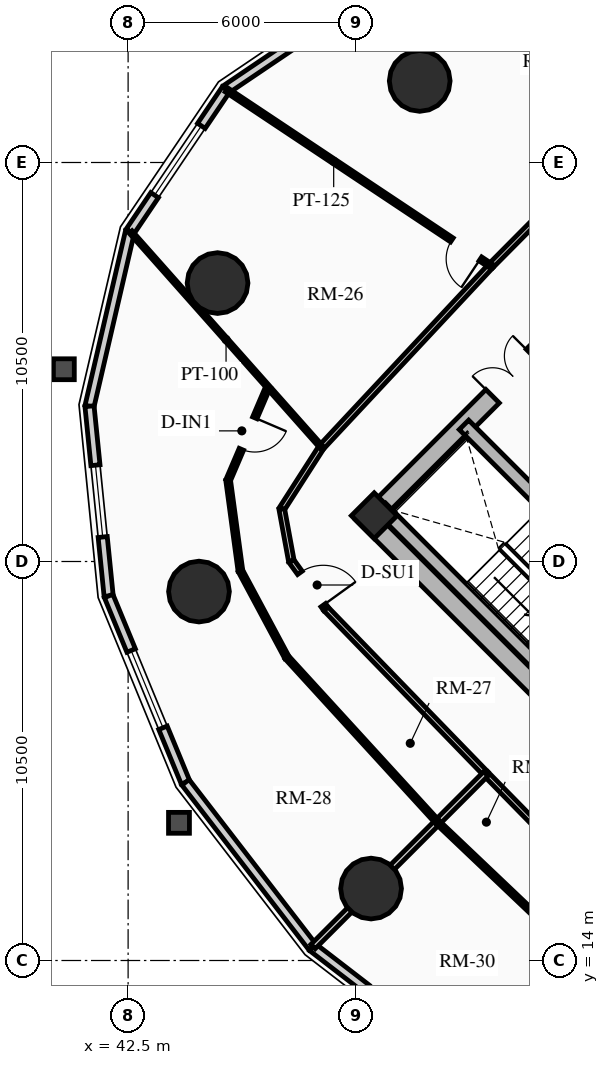
"""IFC4 building model, lengths in metres.
Left out: names, types, materials, properties, quantities, classifications, styles, units other than length and angle.
Written with IfcOpenShell. Run it as: python <this file> out.ifc"""

import sys

from ifc_helpers import new_model, si_unit, direction, frame, frame_2d, origin, origin_2d, place, context, subcontext, project, spatial, rectangle, circle, extrude, source, transform, mapped, element, fill, save


model = new_model("IFC4")
c1 = context("Model", 3, precision=1e-05, world=origin(), true_north=direction((0.0, 1.0)))
c2 = subcontext(c1, "Body", "Model", "MODEL_VIEW")
j1 = project(units=[si_unit("LENGTHUNIT", "METRE"), si_unit("PLANEANGLEUNIT", "RADIAN")], contexts=[c1])
p1 = place(None, origin())
s1 = spatial("IfcSite", under=j1, at=p1, CompositionType="ELEMENT")
p2 = place(p1, origin())
s2 = spatial("IfcBuilding", under=s1, at=p2, CompositionType="ELEMENT")
p3 = place(p2, frame((0.0, 0.0, 27.82)))
s3 = spatial("IfcBuildingStorey", under=s2, at=p3, CompositionType="ELEMENT", Elevation=27.82)
p4 = place(p3, frame((58.773, 15.661, 0.0), z_axis=(0.0, 0.0, 1.0), x_axis=(-0.707106781187, 0.707106781187, 0.0)))
e1 = element("IfcWall", 1, at=p4, inside=s3, PredefinedType="SHEAR", context=c2, shape_type="SweptSolid", body=[
    extrude(rectangle(XDim=14.3, YDim=0.5, at=frame_2d((7.15, 0.0))), origin(), (0.0, 0.0, 1.0), 2.91),
])
p5 = place(p3, frame((48.838, 25.596, 0.0), z_axis=(0.0, 0.0, 1.0), x_axis=(0.707106781187, 0.707106781187, 0.0)))
e2 = element("IfcWall", 2, at=p5, inside=s3, PredefinedType="SHEAR", context=c2, shape_type="SweptSolid", body=[
    extrude(rectangle(XDim=10.7, YDim=0.5, at=frame_2d((5.35, 0.0))), origin(), (0.0, 0.0, 1.0), 2.91),
])
m1 = source(origin(), c2, "Body", "SweptSolid", [
    extrude(rectangle(XDim=1.5, YDim=2.02, at=frame_2d((0.75, 1.01))), frame((0.0, 0.26, 0.0), z_axis=(0.0, -1.0, 0.0), x_axis=(1.0, 0.0, 0.0)), (0.0, 0.0, 1.0), 0.52),
])
p6 = place(p5, frame((4.6, 0.0, 0.0)))
e3 = element("IfcOpeningElement", 3, at=p6, cuts=e2, PredefinedType="OPENING", context=c2, shape_type="MappedRepresentation", body=[
    mapped(m1, transform((0.0, 0.0, 0.0), x_axis=(1.0, 0.0, 0.0), y_axis=(0.0, 1.0, 0.0), z_axis=(0.0, 0.0, 1.0), scale=1.0)),
])
p7 = place(p3, frame((61.096, 18.338, 0.0), z_axis=(0.0, 0.0, 1.0), x_axis=(-0.707106781187, 0.707106781187, 0.0)))
e4 = element("IfcWall", 4, at=p7, inside=s3, PredefinedType="SHEAR", context=c2, shape_type="SweptSolid", body=[
    extrude(rectangle(XDim=13.8, YDim=0.35, at=frame_2d((6.9, 0.0))), origin(), (0.0, 0.0, 1.0), 2.91),
])
m2 = source(origin(), c2, "Body", "SweptSolid", [
    extrude(rectangle(XDim=1.1, YDim=2.015, at=frame_2d((0.55, 1.007))), frame((0.0, 0.185, 0.0), z_axis=(0.0, -1.0, 0.0), x_axis=(1.0, 0.0, 0.0)), (0.0, 0.0, 1.0), 0.37),
])
p8 = place(p7, frame((4.9, 0.0, 0.0)))
e5 = element("IfcOpeningElement", 5, at=p8, cuts=e4, PredefinedType="OPENING", context=c2, shape_type="MappedRepresentation", body=[
    mapped(m2, transform((0.0, 0.0, 0.0), x_axis=(1.0, 0.0, 0.0), y_axis=(0.0, 1.0, 0.0), z_axis=(0.0, 0.0, 1.0), scale=1.0)),
])
m3 = source(origin(), c2, "Body", "SweptSolid", [
    extrude(rectangle(XDim=1.15, YDim=2.02, at=frame_2d((0.575, 1.01))), frame((0.0, 0.185, 0.0), z_axis=(0.0, -1.0, 0.0), x_axis=(1.0, 0.0, 0.0)), (0.0, 0.0, 1.0), 0.37),
])
p9 = place(p7, frame((7.32, 0.0, 0.0)))
e6 = element("IfcOpeningElement", 6, at=p9, cuts=e4, PredefinedType="OPENING", context=c2, shape_type="MappedRepresentation", body=[
    mapped(m3, transform((0.0, 0.0, 0.0), x_axis=(1.0, 0.0, 0.0), y_axis=(0.0, 1.0, 0.0), z_axis=(0.0, 0.0, 1.0), scale=1.0)),
])
p10 = place(p3, frame((53.922, 21.141, 0.0), z_axis=(0.0, 0.0, 1.0), x_axis=(-0.707106781187, 0.707106781187, 0.0)))
e7 = element("IfcWall", 7, at=p10, inside=s3, PredefinedType="SHEAR", context=c2, shape_type="SweptSolid", body=[
    extrude(rectangle(XDim=6.745, YDim=0.35, at=frame_2d((3.373, 0.0))), origin(), (0.0, 0.0, 1.0), 2.91),
])
p11 = place(p3, frame((48.976, 25.706, 0.0), z_axis=(0.0, 0.0, 1.0), x_axis=(0.707106781187, 0.707106781187, 0.0)))
e8 = element("IfcColumn", 8, at=p11, inside=s3, PredefinedType="COLUMN", context=c2, shape_type="SweptSolid", body=[
    extrude(rectangle(XDim=0.85, YDim=0.85, at=origin_2d()), origin(), (0.0, 0.0, 1.0), 2.91),
])
for number, where, z_axis, x_axis in (
    (9, (50.173, 37.146, 0.0), (0.0, 0.0, 1.0), (1.0, 0.0, 0.0)),
    (10, (44.854, 31.827, 0.0), (0.0, 0.0, 1.0), (1.0, 0.0, 0.0)),
    (11, (44.365, 23.709, 0.0), (0.0, 0.0, 1.0), (1.0, 0.0, 0.0)),
    (12, (48.893, 15.893, 0.0), (0.0, 0.0, 1.0), (1.0, 0.0, 0.0)),
):
    element("IfcColumn", number, at=place(p3, frame(where, z_axis=z_axis, x_axis=x_axis)), inside=s3, PredefinedType="USERDEFINED", context=c2, shape_type="SweptSolid", body=[
        extrude(circle(Radius=0.8, at=origin_2d()), origin(), (0.0, 0.0, 1.0), 2.91),
    ])
p12 = place(p3, frame((45.076, 36.924, 0.0), z_axis=(0.0, 0.0, 1.0), x_axis=(0.828776615238, 0.559579594012, 0.0)))
e13 = element("IfcWall", 13, at=p12, inside=s3, PredefinedType="SOLIDWALL", context=c2, shape_type="SweptSolid", body=[
    extrude(rectangle(XDim=4.517, YDim=0.24, at=frame_2d((2.259, 0.0))), origin(), (0.0, 0.0, 1.0), 2.635),
])
p13 = place(p3, frame((42.548, 33.18, 0.0), z_axis=(0.0, 0.0, 1.0), x_axis=(0.559579594012, 0.828776615238, 0.0)))
e14 = element("IfcWall", 14, at=p13, inside=s3, PredefinedType="SOLIDWALL", context=c2, shape_type="SweptSolid", body=[
    extrude(rectangle(XDim=4.517, YDim=0.24, at=frame_2d((2.259, 0.0))), origin(), (0.0, 0.0, 1.0), 2.635),
])
m4 = source(origin(), c2, "Body", "SweptSolid", [
    extrude(rectangle(XDim=2.2, YDim=1.35, at=frame_2d((1.1, 0.675))), frame((0.0, 0.13, 0.0), z_axis=(0.0, -1.0, 0.0), x_axis=(1.0, 0.0, 0.0)), (0.0, 0.0, 1.0), 0.26),
])
p14 = place(p13, frame((1.159, 0.0, 0.65)))
e15 = element("IfcOpeningElement", 15, at=p14, cuts=e14, PredefinedType="OPENING", context=c2, shape_type="MappedRepresentation", body=[
    mapped(m4, transform((0.0, 0.0, 0.0), x_axis=(1.0, 0.0, 0.0), y_axis=(0.0, 1.0, 0.0), z_axis=(0.0, 0.0, 1.0), scale=1.0)),
])
p15 = place(p3, frame((41.484, 28.586, 0.0), z_axis=(0.0, 0.0, 1.0), x_axis=(0.225698919833, 0.974197104074, 0.0)))
e16 = element("IfcWall", 16, at=p15, inside=s3, PredefinedType="SOLIDWALL", context=c2, shape_type="SweptSolid", body=[
    extrude(rectangle(XDim=4.715, YDim=0.24, at=frame_2d((2.357, 0.0))), origin(), (0.0, 0.0, 1.0), 2.635),
])
p16 = place(p3, frame((41.988, 23.593, 0.0), z_axis=(0.0, 0.0, 1.0), x_axis=(-0.100356187272, 0.994951574538, 0.0)))
e17 = element("IfcWall", 17, at=p16, inside=s3, PredefinedType="SOLIDWALL", context=c2, shape_type="SweptSolid", body=[
    extrude(rectangle(XDim=5.019, YDim=0.24, at=frame_2d((2.509, 0.0))), origin(), (0.0, 0.0, 1.0), 2.635),
])
m5 = source(origin(), c2, "Body", "SweptSolid", [
    extrude(rectangle(XDim=1.9, YDim=1.35, at=frame_2d((0.95, 0.675))), frame((0.0, 0.13, 0.0), z_axis=(0.0, -1.0, 0.0), x_axis=(1.0, 0.0, 0.0)), (0.0, 0.0, 1.0), 0.26),
])
p17 = place(p16, frame((1.559, 0.0, 0.65)))
e18 = element("IfcOpeningElement", 18, at=p17, cuts=e17, PredefinedType="OPENING", context=c2, shape_type="MappedRepresentation", body=[
    mapped(m5, transform((0.0, 0.0, 0.0), x_axis=(1.0, 0.0, 0.0), y_axis=(0.0, 1.0, 0.0), z_axis=(0.0, 0.0, 1.0), scale=1.0)),
])
p18 = place(p3, frame((44.01, 18.688, 0.0), z_axis=(0.0, 0.0, 1.0), x_axis=(-0.381113147118, 0.924528403616, 0.0)))
e19 = element("IfcWall", 19, at=p18, inside=s3, PredefinedType="SOLIDWALL", context=c2, shape_type="SweptSolid", body=[
    extrude(rectangle(XDim=5.305, YDim=0.24, at=frame_2d((2.653, 0.0))), origin(), (0.0, 0.0, 1.0), 2.635),
])
p19 = place(p18, frame((1.553, 0.0, 0.65)))
e20 = element("IfcOpeningElement", 20, at=p19, cuts=e19, PredefinedType="OPENING", context=c2, shape_type="MappedRepresentation", body=[
    mapped(m4, transform((0.0, 0.0, 0.0), x_axis=(1.0, 0.0, 0.0), y_axis=(0.0, 1.0, 0.0), z_axis=(0.0, 0.0, 1.0), scale=1.0)),
])
p20 = place(p3, frame((47.352, 14.352, 0.0), z_axis=(0.0, 0.0, 1.0), x_axis=(-0.610557396243, 0.791972010801, 0.0)))
e21 = element("IfcWall", 21, at=p20, inside=s3, PredefinedType="SOLIDWALL", context=c2, shape_type="SweptSolid", body=[
    extrude(rectangle(XDim=5.475, YDim=0.24, at=frame_2d((2.737, 0.0))), origin(), (0.0, 0.0, 1.0), 2.073),
])
p21 = place(p3, frame((51.688, 11.01, 0.0), z_axis=(0.0, 0.0, 1.0), x_axis=(-0.791972010801, 0.610557396243, 0.0)))
e22 = element("IfcWall", 22, at=p21, inside=s3, PredefinedType="SOLIDWALL", context=c2, shape_type="SweptSolid", body=[
    extrude(rectangle(XDim=5.475, YDim=0.24, at=frame_2d((2.737, 0.0))), origin(), (0.0, 0.0, 1.0), 2.073),
])
p22 = place(p21, frame((1.787, 0.0, 0.65)))
e23 = element("IfcOpeningElement", 23, at=p22, cuts=e22, PredefinedType="OPENING", context=c2, shape_type="MappedRepresentation", body=[
    mapped(m5, transform((0.0, 0.0, 0.0), x_axis=(1.0, 0.0, 0.0), y_axis=(0.0, 1.0, 0.0), z_axis=(0.0, 0.0, 1.0), scale=1.0)),
])
p23 = place(p3, frame((54.427, 34.683, 0.0), z_axis=(0.0, 0.0, 1.0), x_axis=(-0.704178989986, -0.710022499687, 0.0)))
e24 = element("IfcWall", 24, at=p23, inside=s3, PredefinedType="PARTITIONING", context=c2, shape_type="SweptSolid", body=[
    extrude(rectangle(XDim=3.384, YDim=0.15, at=frame_2d((1.692, 0.0))), origin(), (0.0, 0.0, 1.0), 2.159),
])
p24 = place(p3, frame((52.043, 32.28, 0.0), z_axis=(0.0, 0.0, 1.0), x_axis=(-0.682606081633, -0.730786519661, 0.0)))
e25 = element("IfcWall", 25, at=p24, inside=s3, PredefinedType="PARTITIONING", context=c2, shape_type="SweptSolid", body=[
    extrude(rectangle(XDim=6.527, YDim=0.15, at=frame_2d((3.263, 0.0))), origin(), (0.0, 0.0, 1.0), 2.159),
])
p25 = place(p3, frame((47.588, 27.51, 0.0), z_axis=(0.0, 0.0, 1.0), x_axis=(-0.540202619347, -0.841534984449, 0.0)))
e26 = element("IfcWall", 26, at=p25, inside=s3, PredefinedType="PARTITIONING", context=c2, shape_type="SweptSolid", body=[
    extrude(rectangle(XDim=1.935, YDim=0.15, at=frame_2d((0.967, 0.0))), origin(), (0.0, 0.0, 1.0), 2.159),
])
p26 = place(p3, frame((46.543, 25.882, 0.0), z_axis=(0.0, 0.0, 1.0), x_axis=(0.181153502579, -0.983454832976, 0.0)))
e27 = element("IfcWall", 27, at=p26, inside=s3, PredefinedType="PARTITIONING", context=c2, shape_type="SweptSolid", body=[
    extrude(rectangle(XDim=1.392, YDim=0.15, at=frame_2d((0.696, 0.0))), origin(), (0.0, 0.0, 1.0), 2.159),
])
p27 = place(p3, frame((46.795, 24.513, 0.0), z_axis=(0.0, 0.0, 1.0), x_axis=(0.585628197524, -0.810579801294, 0.0)))
e28 = element("IfcWall", 28, at=p27, inside=s3, PredefinedType="PARTITIONING", context=c2, shape_type="SweptSolid", body=[
    extrude(rectangle(XDim=1.554, YDim=0.15, at=frame_2d((0.777, 0.0))), origin(), (0.0, 0.0, 1.0), 2.205),
])
m6 = source(origin(), c2, "Body", "SweptSolid", [
    extrude(rectangle(XDim=1.05, YDim=2.015, at=frame_2d((0.525, 1.007))), frame((0.0, 0.085, 0.0), z_axis=(0.0, -1.0, 0.0), x_axis=(1.0, 0.0, 0.0)), (0.0, 0.0, 1.0), 0.17),
])
p28 = place(p27, frame((0.384, 0.0, 0.0)))
e29 = element("IfcOpeningElement", 29, at=p28, cuts=e28, PredefinedType="OPENING", context=c2, shape_type="MappedRepresentation", body=[
    mapped(m6, transform((0.0, 0.0, 0.0), x_axis=(1.0, 0.0, 0.0), y_axis=(0.0, 1.0, 0.0), z_axis=(0.0, 0.0, 1.0), scale=1.0)),
])
p29 = place(p3, frame((47.706, 23.253, 0.0), z_axis=(0.0, 0.0, 1.0), x_axis=(0.696179266346, -0.717867974707, 0.0)))
e30 = element("IfcWall", 30, at=p29, inside=s3, PredefinedType="PARTITIONING", context=c2, shape_type="SweptSolid", body=[
    extrude(rectangle(XDim=6.045, YDim=0.15, at=frame_2d((3.022, 0.0))), origin(), (0.0, 0.0, 1.0), 2.635),
])
p30 = place(p3, frame((51.914, 18.914, 0.0), z_axis=(0.0, 0.0, 1.0), x_axis=(0.699999313799, -0.714143515465, 0.0)))
e31 = element("IfcWall", 31, at=p30, inside=s3, PredefinedType="PARTITIONING", context=c2, shape_type="SweptSolid", body=[
    extrude(rectangle(XDim=6.162, YDim=0.15, at=frame_2d((3.081, 0.0))), origin(), (0.0, 0.0, 1.0), 2.159),
])
p31 = place(p3, frame((47.588, 27.51, 0.0), z_axis=(0.0, 0.0, 1.0), x_axis=(-0.663646630644, 0.74804622159, 0.0)))
e32 = element("IfcWall", 32, at=p31, inside=s3, PredefinedType="MOVABLE", context=c2, shape_type="SweptSolid", body=[
    extrude(rectangle(XDim=7.567, YDim=0.1, at=frame_2d((3.784, 0.0))), origin(), (0.0, 0.0, 1.0), 2.073),
])
p32 = place(p3, frame((51.914, 18.914, 0.0), z_axis=(0.0, 0.0, 1.0), x_axis=(-0.707106781187, -0.707106781187, 0.0)))
e33 = element("IfcWall", 33, at=p32, inside=s3, PredefinedType="PARTITIONING", context=c2, shape_type="SweptSolid", body=[
    extrude(rectangle(XDim=6.431, YDim=0.16, at=frame_2d((3.215, 0.0))), origin(), (0.0, 0.0, 1.0), 2.073),
])
p33 = place(p3, frame((52.043, 32.28, 0.0), z_axis=(0.0, 0.0, 1.0), x_axis=(-0.832355916658, 0.554241488887, 0.0)))
e34 = element("IfcWall", 34, at=p33, inside=s3, PredefinedType="PARTITIONING", context=c2, shape_type="SweptSolid", body=[
    extrude(rectangle(XDim=8.354, YDim=0.125, at=frame_2d((4.177, 0.0))), origin(), (0.0, 0.0, 1.0), 2.073),
])
m7 = source(origin(), c2, "Body", "SweptSolid", [
    extrude(rectangle(XDim=0.9, YDim=2.005, at=frame_2d((0.45, 1.002))), frame((0.0, 0.073, 0.0), z_axis=(0.0, -1.0, 0.0), x_axis=(1.0, 0.0, 0.0)), (0.0, 0.0, 1.0), 0.145),
])
p34 = place(p33, frame((0.33, 0.0, 0.0)))
e35 = element("IfcOpeningElement", 35, at=p34, cuts=e34, PredefinedType="OPENING", context=c2, shape_type="MappedRepresentation", body=[
    mapped(m7, transform((0.0, 0.0, 0.0), x_axis=(1.0, 0.0, 0.0), y_axis=(0.0, 1.0, 0.0), z_axis=(0.0, 0.0, 1.0), scale=1.0)),
])
p35 = place(p3, frame((46.182, 29.095, 0.0), z_axis=(0.0, 0.0, 1.0), x_axis=(-0.39298176502, -0.919546264394, 0.0)))
e36 = element("IfcWall", 36, at=p35, inside=s3, PredefinedType="PARTITIONING", context=c2, shape_type="SweptSolid", body=[
    extrude(rectangle(XDim=2.672, YDim=0.125, at=frame_2d((1.336, 0.0))), origin(), (0.0, 0.0, 1.0), 2.205),
])
p36 = place(p35, frame((0.886, 0.0, 0.0)))
e37 = element("IfcOpeningElement", 37, at=p36, cuts=e36, PredefinedType="OPENING", context=c2, shape_type="MappedRepresentation", body=[
    mapped(m7, transform((0.0, 0.0, 0.0), x_axis=(1.0, 0.0, 0.0), y_axis=(0.0, 1.0, 0.0), z_axis=(0.0, 0.0, 1.0), scale=1.0)),
])
p37 = place(p3, frame((45.132, 26.638, 0.0), z_axis=(0.0, 0.0, 1.0), x_axis=(0.134279147929, -0.990943545532, 0.0)))
e38 = element("IfcWall", 38, at=p37, inside=s3, PredefinedType="PARTITIONING", context=c2, shape_type="SweptSolid", body=[
    extrude(rectangle(XDim=2.404, YDim=0.125, at=frame_2d((1.202, 0.0))), origin(), (0.0, 0.0, 1.0), 2.159),
])
p38 = place(p3, frame((45.455, 24.256, 0.0), z_axis=(0.0, 0.0, 1.0), x_axis=(0.472268582458, -0.881454698792, 0.0)))
e39 = element("IfcWall", 39, at=p38, inside=s3, PredefinedType="PARTITIONING", context=c2, shape_type="SweptSolid", body=[
    extrude(rectangle(XDim=2.585, YDim=0.125, at=frame_2d((1.292, 0.0))), origin(), (0.0, 0.0, 1.0), 2.159),
])
p39 = place(p3, frame((46.676, 21.978, 0.0), z_axis=(0.0, 0.0, 1.0), x_axis=(0.67473816271, -0.738057187339, 0.0)))
e40 = element("IfcWall", 40, at=p39, inside=s3, PredefinedType="PARTITIONING", context=c2, shape_type="SweptSolid", body=[
    extrude(rectangle(XDim=5.876, YDim=0.125, at=frame_2d((2.938, 0.0))), origin(), (0.0, 0.0, 1.0), 2.635),
])
p40 = place(p3, frame((50.641, 17.641, 0.0), z_axis=(0.0, 0.0, 1.0), x_axis=(0.724909383019, -0.688844239586, 0.0)))
e41 = element("IfcWall", 41, at=p40, inside=s3, PredefinedType="PARTITIONING", context=c2, shape_type="SweptSolid", body=[
    extrude(rectangle(XDim=5.957, YDim=0.125, at=frame_2d((2.979, 0.0))), origin(), (0.0, 0.0, 1.0), 2.159),
])
m8 = source(origin(), c2, "Body", "SweptSolid", [
    extrude(rectangle(XDim=2.2, YDim=1.35, at=frame_2d((1.1, 0.675))), frame((0.0, 0.03, 0.0), z_axis=(0.0, -1.0, 0.0), x_axis=(1.0, 0.0, 0.0)), (0.0, 0.0, 1.0), 0.06),
])
p41 = place(p14, origin())
e42 = element("IfcWindow", 42, at=p41, inside=s3, PartitioningType="DOUBLE_PANEL_VERTICAL", PredefinedType="WINDOW", context=c2, shape_type="MappedRepresentation", body=[
    mapped(m8, transform((0.0, 0.0, 0.0), x_axis=(1.0, 0.0, 0.0), y_axis=(0.0, 1.0, 0.0), z_axis=(0.0, 0.0, 1.0), scale=1.0)),
])
fill(e15, e42)
m9 = source(origin(), c2, "Body", "SweptSolid", [
    extrude(rectangle(XDim=1.9, YDim=1.35, at=frame_2d((0.95, 0.675))), frame((0.0, 0.03, 0.0), z_axis=(0.0, -1.0, 0.0), x_axis=(1.0, 0.0, 0.0)), (0.0, 0.0, 1.0), 0.06),
])
p42 = place(p17, origin())
e43 = element("IfcWindow", 43, at=p42, inside=s3, PartitioningType="DOUBLE_PANEL_VERTICAL", PredefinedType="WINDOW", context=c2, shape_type="MappedRepresentation", body=[
    mapped(m9, transform((0.0, 0.0, 0.0), x_axis=(1.0, 0.0, 0.0), y_axis=(0.0, 1.0, 0.0), z_axis=(0.0, 0.0, 1.0), scale=1.0)),
])
fill(e18, e43)
p43 = place(p19, origin())
e44 = element("IfcWindow", 44, at=p43, inside=s3, PartitioningType="DOUBLE_PANEL_VERTICAL", PredefinedType="WINDOW", context=c2, shape_type="MappedRepresentation", body=[
    mapped(m8, transform((0.0, 0.0, 0.0), x_axis=(1.0, 0.0, 0.0), y_axis=(0.0, 1.0, 0.0), z_axis=(0.0, 0.0, 1.0), scale=1.0)),
])
fill(e20, e44)
m10 = source(origin(), c2, "Body", "SweptSolid", [
    extrude(rectangle(XDim=1.5, YDim=2.02, at=frame_2d((0.75, 1.01))), frame((0.0, 0.025, 0.0), z_axis=(0.0, -1.0, 0.0), x_axis=(1.0, 0.0, 0.0)), (0.0, 0.0, 1.0), 0.05),
])
p44 = place(p6, origin())
e45 = element("IfcDoor", 45, at=p44, inside=s3, OperationType="DOUBLE_DOOR_SINGLE_SWING", PredefinedType="DOOR", context=c2, shape_type="MappedRepresentation", body=[
    mapped(m10, transform((0.0, 0.0, 0.0), x_axis=(1.0, 0.0, 0.0), y_axis=(0.0, 1.0, 0.0), z_axis=(0.0, 0.0, 1.0), scale=1.0)),
])
fill(e3, e45)
m11 = source(origin(), c2, "Body", "SweptSolid", [
    extrude(rectangle(XDim=0.9, YDim=2.005, at=frame_2d((0.45, 1.002))), frame((0.0, 0.025, 0.0), z_axis=(0.0, -1.0, 0.0), x_axis=(1.0, 0.0, 0.0)), (0.0, 0.0, 1.0), 0.05),
])
p45 = place(p34, origin())
e46 = element("IfcDoor", 46, at=p45, inside=s3, OperationType="SINGLE_SWING_LEFT", PredefinedType="DOOR", context=c2, shape_type="MappedRepresentation", body=[
    mapped(m11, transform((0.0, 0.0, 0.0), x_axis=(1.0, 0.0, 0.0), y_axis=(0.0, 1.0, 0.0), z_axis=(0.0, 0.0, 1.0), scale=1.0)),
])
fill(e35, e46)
m12 = source(origin(), c2, "Body", "SweptSolid", [
    extrude(rectangle(XDim=1.05, YDim=2.015, at=frame_2d((0.525, 1.007))), frame((0.0, 0.025, 0.0), z_axis=(0.0, -1.0, 0.0), x_axis=(1.0, 0.0, 0.0)), (0.0, 0.0, 1.0), 0.05),
])
p46 = place(p28, origin())
e47 = element("IfcDoor", 47, at=p46, inside=s3, OperationType="SINGLE_SWING_RIGHT", PredefinedType="DOOR", context=c2, shape_type="MappedRepresentation", body=[
    mapped(m12, transform((0.0, 0.0, 0.0), x_axis=(1.0, 0.0, 0.0), y_axis=(0.0, 1.0, 0.0), z_axis=(0.0, 0.0, 1.0), scale=1.0)),
])
fill(e29, e47)
p47 = place(p36, origin())
e48 = element("IfcDoor", 48, at=p47, inside=s3, OperationType="SINGLE_SWING_LEFT", PredefinedType="DOOR", context=c2, shape_type="MappedRepresentation", body=[
    mapped(m11, transform((0.0, 0.0, 0.0), x_axis=(1.0, 0.0, 0.0), y_axis=(0.0, 1.0, 0.0), z_axis=(0.0, 0.0, 1.0), scale=1.0)),
])
fill(e37, e48)
save(model, sys.argv[1])
